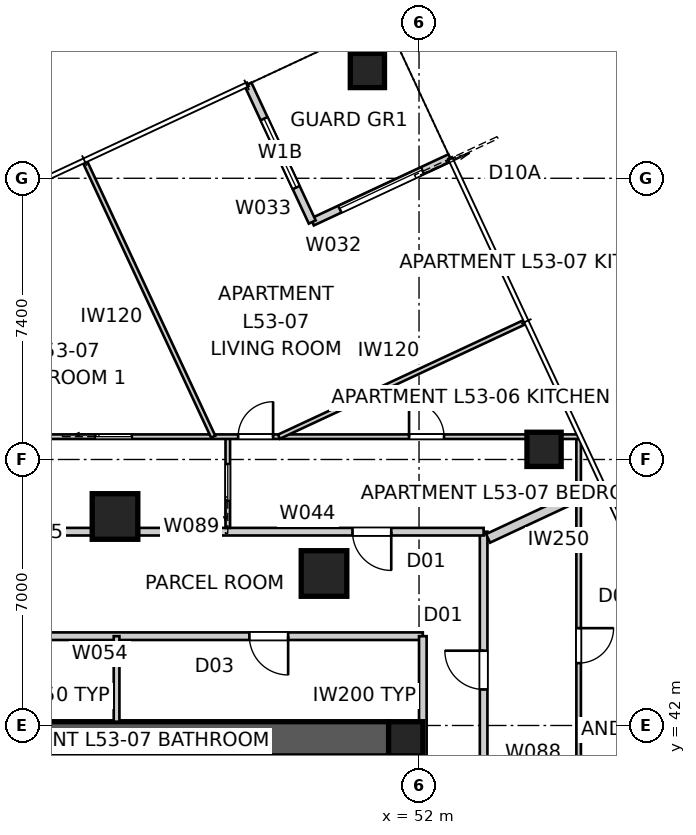
"""IFC4 building model, lengths in metres.
Left out: names, types, materials, properties, quantities, classifications, styles, units other than length and angle.
Written with IfcOpenShell. Run it as: python <this file> out.ifc"""

import sys

from ifc_helpers import new_model, si_unit, direction, frame, frame_2d, origin, origin_2d, place, context, subcontext, project, spatial, polyline, rectangle, outline, extrude, element, fill, save


model = new_model("IFC4")
c1 = context("Model", 3, precision=1e-05, world=origin(), true_north=direction((0.0, 1.0)))
c2 = subcontext(c1, "Body", "Model", "MODEL_VIEW")
j1 = project(units=[si_unit("LENGTHUNIT", "METRE"), si_unit("PLANEANGLEUNIT", "RADIAN")], contexts=[c1])
p1 = place(None, origin())
s1 = spatial("IfcSite", under=j1, at=p1, CompositionType="ELEMENT")
p2 = place(p1, origin())
s2 = spatial("IfcBuilding", under=s1, at=p2, CompositionType="ELEMENT")
p3 = place(p2, frame((0.0, 0.0, 193.0)))
s3 = spatial("IfcBuildingStorey", under=s2, at=p3, CompositionType="ELEMENT", Elevation=193.0)
p4 = place(p3, frame((28.8, 41.65, 0.0), z_axis=(0.0, 0.0, 1.0), x_axis=(1.0, 0.0, 0.0)))
e1 = element("IfcWall", 1, at=p4, inside=s3, PredefinedType="SHEAR", context=c2, shape_type="SweptSolid", body=[
    extrude(outline(polyline([(0.0, -0.45), (22.4, -0.45), (22.4, -0.025), (22.85, -0.025), (22.85, 0.025), (22.4, 0.025), (22.4, 0.45), (0.0, 0.45), (0.0, 0.025), (-0.45, 0.025), (-0.45, -0.025), (0.0, -0.025), (0.0, -0.45)])), origin(), (0.0, 0.0, 1.0), 3.4),
])
p5 = place(p3, frame((51.65, 18.8, 0.0), z_axis=(0.0, 0.0, 1.0), x_axis=(0.0, 1.0, 0.0)))
e2 = element("IfcWall", 2, at=p5, inside=s3, PredefinedType="SHEAR", context=c2, shape_type="SweptSolid", body=[
    extrude(outline(polyline([(0.0, -0.45), (22.4, -0.45), (22.4, -0.025), (22.85, -0.025), (22.85, 0.025), (22.4, 0.025), (22.4, 0.45), (0.0, 0.45), (0.0, 0.025), (-0.45, 0.025), (-0.45, -0.025), (0.0, -0.025), (0.0, -0.45)])), origin(), (0.0, 0.0, 1.0), 3.4),
])
p6 = place(p5, frame((11.14, 0.0, 0.0)))
e3 = element("IfcOpeningElement", 3, at=p6, cuts=e2, PredefinedType="OPENING", context=c2, shape_type="SweptSolid", body=[
    extrude(rectangle(XDim=1.02, YDim=2.4, at=frame_2d((0.51, 1.2))), frame((0.0, 0.46, 0.0), z_axis=(0.0, -1.0, 0.0), x_axis=(1.0, 0.0, 0.0)), (0.0, 0.0, 1.0), 0.92),
])
for number, where, z_axis, x_axis in (
    (4, (51.65, 41.65, 0.0), (0.0, 0.0, 1.0), (1.0, 0.0, 0.0)),
    (5, (55.29, 49.267, 0.0), (0.0, 0.0, 1.0), (1.0, 0.0, 0.0)),
    (6, (50.641, 59.236, 0.0), (0.0, 0.0, 1.0), (1.0, 0.0, 0.0)),
):
    element("IfcColumn", number, at=place(p3, frame(where, z_axis=z_axis, x_axis=x_axis)), inside=s3, PredefinedType="COLUMN", context=c2, shape_type="SweptSolid", body=[
        extrude(rectangle(XDim=0.9, YDim=0.9, at=origin_2d()), origin(), (0.0, 0.0, 1.0), 3.4),
    ])
for number, where, z_axis, x_axis in (
    (7, (49.5, 46.0, 0.0), (0.0, 0.0, 1.0), (1.0, 0.0, 0.0)),
    (8, (44.0, 47.5, 0.0), (0.0, 0.0, 1.0), (1.0, 0.0, 0.0)),
):
    element("IfcColumn", number, at=place(p3, frame(where, z_axis=z_axis, x_axis=x_axis)), inside=s3, PredefinedType="COLUMN", context=c2, shape_type="SweptSolid", body=[
        extrude(rectangle(XDim=1.2, YDim=1.2, at=origin_2d()), origin(), (0.0, 0.0, 1.0), 3.4),
    ])
p7 = place(p3, frame((52.815, 56.94, 0.0), z_axis=(0.0, 0.0, 1.0), x_axis=(-0.906289140828, -0.422658246362, 0.0)))
e9 = element("IfcWall", 9, at=p7, inside=s3, PredefinedType="SOLIDWALL", context=c2, shape_type="SweptSolid", body=[
    extrude(rectangle(XDim=4.0, YDim=0.2, at=frame_2d((2.0, 0.0))), origin(), (0.0, 0.0, 1.0), 3.25),
])
p8 = place(p7, frame((0.8, 0.0, 0.0)))
e10 = element("IfcOpeningElement", 10, at=p8, cuts=e9, PredefinedType="OPENING", context=c2, shape_type="SweptSolid", body=[
    extrude(rectangle(XDim=2.4, YDim=2.1, at=frame_2d((1.2, 1.05))), frame((0.0, 0.11, 0.0), z_axis=(0.0, -1.0, 0.0), x_axis=(1.0, 0.0, 0.0)), (0.0, 0.0, 1.0), 0.22),
])
p9 = place(p3, frame((49.19, 55.25, 0.0), z_axis=(0.0, 0.0, 1.0), x_axis=(-0.422658246362, 0.906289140828, 0.0)))
e11 = element("IfcWall", 11, at=p9, inside=s3, PredefinedType="SOLIDWALL", context=c2, shape_type="SweptSolid", body=[
    extrude(rectangle(XDim=4.0, YDim=0.2, at=frame_2d((2.0, 0.0))), origin(), (0.0, 0.0, 1.0), 3.25),
])
p10 = place(p9, frame((1.0, 0.0, 0.45)))
e12 = element("IfcOpeningElement", 12, at=p10, cuts=e11, PredefinedType="OPENING", context=c2, shape_type="SweptSolid", body=[
    extrude(rectangle(XDim=2.0, YDim=1.8, at=frame_2d((1.0, 0.9))), frame((0.0, 0.11, 0.0), z_axis=(0.0, -1.0, 0.0), x_axis=(1.0, 0.0, 0.0)), (0.0, 0.0, 1.0), 0.22),
])
p11 = place(p3, frame((53.7, 13.3, 0.0), z_axis=(0.0, 0.0, 1.0), x_axis=(0.0, 1.0, 0.0)))
e13 = element("IfcWall", 13, at=p11, inside=s3, PredefinedType="PARTITIONING", context=c2, shape_type="SweptSolid", body=[
    extrude(rectangle(XDim=33.8, YDim=0.2, at=frame_2d((16.9, 0.0))), origin(), (0.0, 0.0, 1.0), 3.25),
])
p12 = place(p11, frame((6.984, 0.0, 0.0)))
e14 = element("IfcOpeningElement", 14, at=p12, cuts=e13, PredefinedType="OPENING", context=c2, shape_type="SweptSolid", body=[
    extrude(rectangle(XDim=1.02, YDim=2.34, at=frame_2d((0.51, 1.17))), frame((0.0, 0.11, 0.0), z_axis=(0.0, -1.0, 0.0), x_axis=(1.0, 0.0, 0.0)), (0.0, 0.0, 1.0), 0.22),
])
p13 = place(p11, frame((29.648, 0.0, 0.0)))
e15 = element("IfcOpeningElement", 15, at=p13, cuts=e13, PredefinedType="OPENING", context=c2, shape_type="SweptSolid", body=[
    extrude(rectangle(XDim=1.02, YDim=2.34, at=frame_2d((0.51, 1.17))), frame((0.0, 0.11, 0.0), z_axis=(0.0, -1.0, 0.0), x_axis=(1.0, 0.0, 0.0)), (0.0, 0.0, 1.0), 0.22),
])
p14 = place(p11, frame((15.16, 0.0, 0.0)))
e16 = element("IfcOpeningElement", 16, at=p14, cuts=e13, PredefinedType="OPENING", context=c2, shape_type="SweptSolid", body=[
    extrude(rectangle(XDim=1.02, YDim=2.34, at=frame_2d((0.51, 1.17))), frame((0.0, 0.11, 0.0), z_axis=(0.0, -1.0, 0.0), x_axis=(1.0, 0.0, 0.0)), (0.0, 0.0, 1.0), 0.22),
])
p15 = place(p3, frame((53.7, 47.1, 0.0), z_axis=(0.0, 0.0, 1.0), x_axis=(-1.0, 0.0, 0.0)))
e17 = element("IfcWall", 17, at=p15, inside=s3, PredefinedType="PARTITIONING", context=c2, shape_type="SweptSolid", body=[
    extrude(rectangle(XDim=7.392, YDim=0.2, at=frame_2d((3.696, 0.0))), origin(), (0.0, 0.0, 1.0), 3.25),
])
p16 = place(p15, frame((2.431, 0.0, 0.0)))
e18 = element("IfcOpeningElement", 18, at=p16, cuts=e17, PredefinedType="OPENING", context=c2, shape_type="SweptSolid", body=[
    extrude(rectangle(XDim=1.02, YDim=2.34, at=frame_2d((0.51, 1.17))), frame((0.0, 0.11, 0.0), z_axis=(0.0, -1.0, 0.0), x_axis=(1.0, 0.0, 0.0)), (0.0, 0.0, 1.0), 0.22),
])
p17 = place(p3, frame((46.308, 47.1, 0.0), z_axis=(0.0, 0.0, 1.0), x_axis=(-1.0, 0.0, 0.0)))
e19 = element("IfcWall", 19, at=p17, inside=s3, PredefinedType="PARTITIONING", context=c2, shape_type="SweptSolid", body=[
    extrude(rectangle(XDim=1.683, YDim=0.2, at=frame_2d((0.842, 0.0))), origin(), (0.0, 0.0, 1.0), 2.55),
])
p18 = place(p3, frame((44.625, 47.1, 0.0), z_axis=(0.0, 0.0, 1.0), x_axis=(-1.0, 0.0, 0.0)))
e20 = element("IfcWall", 20, at=p18, inside=s3, PredefinedType="PARTITIONING", context=c2, shape_type="SweptSolid", body=[
    extrude(rectangle(XDim=9.25, YDim=0.2, at=frame_2d((4.625, 0.0))), origin(), (0.0, 0.0, 1.0), 3.25),
])
p19 = place(p3, frame((56.83, 48.33, 0.0), z_axis=(0.0, 0.0, 1.0), x_axis=(-0.906310647924, -0.422612126495, 0.0)))
e21 = element("IfcWall", 21, at=p19, inside=s3, PredefinedType="PARTITIONING", context=c2, shape_type="SweptSolid", body=[
    extrude(rectangle(XDim=3.325, YDim=0.25, at=frame_2d((1.663, 0.0))), origin(), (0.0, 0.0, 1.0), 3.25),
])
p20 = place(p3, frame((52.1, 44.35, 0.0), z_axis=(0.0, 0.0, 1.0), x_axis=(-1.0, 0.0, 0.0)))
e22 = element("IfcWall", 22, at=p20, inside=s3, PredefinedType="PARTITIONING", context=c2, shape_type="SweptSolid", body=[
    extrude(rectangle(XDim=24.2, YDim=0.2, at=frame_2d((12.1, 0.0))), origin(), (0.0, 0.0, 1.0), 3.25),
])
p21 = place(p20, frame((12.437, 0.0, 0.0)))
e23 = element("IfcOpeningElement", 23, at=p21, cuts=e22, PredefinedType="OPENING", context=c2, shape_type="SweptSolid", body=[
    extrude(rectangle(XDim=1.02, YDim=2.1, at=frame_2d((0.51, 1.05))), frame((0.0, 0.11, 0.0), z_axis=(0.0, -1.0, 0.0), x_axis=(1.0, 0.0, 0.0)), (0.0, 0.0, 1.0), 0.22),
])
p22 = place(p20, frame((3.544, 0.0, 0.0)))
e24 = element("IfcOpeningElement", 24, at=p22, cuts=e22, PredefinedType="OPENING", context=c2, shape_type="SweptSolid", body=[
    extrude(rectangle(XDim=1.02, YDim=2.1, at=frame_2d((0.51, 1.05))), frame((0.0, 0.11, 0.0), z_axis=(0.0, -1.0, 0.0), x_axis=(1.0, 0.0, 0.0)), (0.0, 0.0, 1.0), 0.22),
])
p23 = place(p20, frame((19.883, 0.0, 0.0)))
e25 = element("IfcOpeningElement", 25, at=p23, cuts=e22, PredefinedType="OPENING", context=c2, shape_type="SweptSolid", body=[
    extrude(rectangle(XDim=1.02, YDim=2.1, at=frame_2d((0.51, 1.05))), frame((0.0, 0.11, 0.0), z_axis=(0.0, -1.0, 0.0), x_axis=(1.0, 0.0, 0.0)), (0.0, 0.0, 1.0), 0.22),
])
p24 = place(p3, frame((52.1, 41.18, 0.0), z_axis=(0.0, 0.0, 1.0), x_axis=(0.0, 1.0, 0.0)))
e26 = element("IfcWall", 26, at=p24, inside=s3, PredefinedType="PARTITIONING", context=c2, shape_type="SweptSolid", body=[
    extrude(rectangle(XDim=3.17, YDim=0.2, at=frame_2d((1.585, 0.0))), origin(), (0.0, 0.0, 1.0), 3.25),
])
p25 = place(p3, frame((44.042, 42.1, 0.0), z_axis=(0.0, 0.0, 1.0), x_axis=(0.0, 1.0, 0.0)))
e27 = element("IfcWall", 27, at=p25, inside=s3, PredefinedType="SOLIDWALL", context=c2, shape_type="SweptSolid", body=[
    extrude(rectangle(XDim=2.25, YDim=0.15, at=frame_2d((1.125, 0.0))), origin(), (0.0, 0.0, 1.0), 3.25),
])
p26 = place(p3, frame((56.2, 49.642, 0.0), z_axis=(0.0, 0.0, 1.0), x_axis=(0.0, -1.0, 0.0)))
e28 = element("IfcWall", 28, at=p26, inside=s3, PredefinedType="PARTITIONING", context=c2, shape_type="SweptSolid", body=[
    extrude(rectangle(XDim=37.421, YDim=0.12, at=frame_2d((18.71, 0.0))), origin(), (0.0, 0.0, 1.0), 2.55),
])
p27 = place(p26, frame((27.488, 0.0, 0.0)))
e29 = element("IfcOpeningElement", 29, at=p27, cuts=e28, PredefinedType="OPENING", context=c2, shape_type="SweptSolid", body=[
    extrude(rectangle(XDim=0.92, YDim=2.34, at=frame_2d((0.46, 1.17))), frame((0.0, 0.07, 0.0), z_axis=(0.0, -1.0, 0.0), x_axis=(1.0, 0.0, 0.0)), (0.0, 0.0, 1.0), 0.14),
])
p28 = place(p26, frame((5.08, 0.0, 0.0)))
e30 = element("IfcOpeningElement", 30, at=p28, cuts=e28, PredefinedType="OPENING", context=c2, shape_type="SweptSolid", body=[
    extrude(rectangle(XDim=0.92, YDim=2.34, at=frame_2d((0.46, 1.17))), frame((0.0, 0.07, 0.0), z_axis=(0.0, -1.0, 0.0), x_axis=(1.0, 0.0, 0.0)), (0.0, 0.0, 1.0), 0.14),
])
p29 = place(p26, frame((19.592, 0.0, 0.0)))
e31 = element("IfcOpeningElement", 31, at=p29, cuts=e28, PredefinedType="OPENING", context=c2, shape_type="SweptSolid", body=[
    extrude(rectangle(XDim=0.92, YDim=2.34, at=frame_2d((0.46, 1.17))), frame((0.0, 0.07, 0.0), z_axis=(0.0, -1.0, 0.0), x_axis=(1.0, 0.0, 0.0)), (0.0, 0.0, 1.0), 0.14),
])
p30 = place(p3, frame((46.968, 47.2, 0.0), z_axis=(0.0, 0.0, 1.0), x_axis=(0.0, 1.0, 0.0)))
e32 = element("IfcWall", 32, at=p30, inside=s3, PredefinedType="PARTITIONING", context=c2, shape_type="SweptSolid", body=[
    extrude(rectangle(XDim=2.4, YDim=0.12, at=frame_2d((1.2, 0.0))), origin(), (0.0, 0.0, 1.0), 3.25),
])
p31 = place(p30, frame((0.72, 0.0, 0.0)))
e33 = element("IfcOpeningElement", 33, at=p31, cuts=e32, PredefinedType="OPENING", context=c2, shape_type="SweptSolid", body=[
    extrude(rectangle(XDim=0.96, YDim=2.1, at=frame_2d((0.48, 1.05))), frame((0.0, 0.07, 0.0), z_axis=(0.0, -1.0, 0.0), x_axis=(1.0, 0.0, 0.0)), (0.0, 0.0, 1.0), 0.14),
])
p32 = place(p3, frame((30.86, 49.6, 0.0), z_axis=(0.0, 0.0, 1.0), x_axis=(1.0, 0.0, 0.0)))
e34 = element("IfcWall", 34, at=p32, inside=s3, PredefinedType="PARTITIONING", context=c2, shape_type="SweptSolid", body=[
    extrude(rectangle(XDim=25.333, YDim=0.12, at=frame_2d((12.667, 0.0))), origin(), (0.0, 0.0, 1.0), 3.25),
])
p33 = place(p32, frame((20.877, 0.0, 0.0)))
e35 = element("IfcOpeningElement", 35, at=p33, cuts=e34, PredefinedType="OPENING", context=c2, shape_type="SweptSolid", body=[
    extrude(rectangle(XDim=0.92, YDim=2.34, at=frame_2d((0.46, 1.17))), frame((0.0, 0.07, 0.0), z_axis=(0.0, -1.0, 0.0), x_axis=(1.0, 0.0, 0.0)), (0.0, 0.0, 1.0), 0.14),
])
p34 = place(p32, frame((16.38, 0.0, 0.0)))
e36 = element("IfcOpeningElement", 36, at=p34, cuts=e34, PredefinedType="OPENING", context=c2, shape_type="SweptSolid", body=[
    extrude(rectangle(XDim=0.92, YDim=2.34, at=frame_2d((0.46, 1.17))), frame((0.0, 0.07, 0.0), z_axis=(0.0, -1.0, 0.0), x_axis=(1.0, 0.0, 0.0)), (0.0, 0.0, 1.0), 0.14),
])
p35 = place(p32, frame((12.623, 0.0, 0.0)))
e37 = element("IfcOpeningElement", 37, at=p35, cuts=e34, PredefinedType="OPENING", context=c2, shape_type="SweptSolid", body=[
    extrude(rectangle(XDim=0.96, YDim=2.1, at=frame_2d((0.48, 1.05))), frame((0.0, 0.07, 0.0), z_axis=(0.0, -1.0, 0.0), x_axis=(1.0, 0.0, 0.0)), (0.0, 0.0, 1.0), 0.14),
])
p36 = place(p32, frame((7.802, 0.0, 0.0)))
e38 = element("IfcOpeningElement", 38, at=p36, cuts=e34, PredefinedType="OPENING", context=c2, shape_type="SweptSolid", body=[
    extrude(rectangle(XDim=0.96, YDim=2.1, at=frame_2d((0.48, 1.05))), frame((0.0, 0.07, 0.0), z_axis=(0.0, -1.0, 0.0), x_axis=(1.0, 0.0, 0.0)), (0.0, 0.0, 1.0), 0.14),
])
p37 = place(p32, frame((2.168, 0.0, 0.0)))
e39 = element("IfcOpeningElement", 39, at=p37, cuts=e34, PredefinedType="OPENING", context=c2, shape_type="SweptSolid", body=[
    extrude(rectangle(XDim=0.96, YDim=2.1, at=frame_2d((0.48, 1.05))), frame((0.0, 0.07, 0.0), z_axis=(0.0, -1.0, 0.0), x_axis=(1.0, 0.0, 0.0)), (0.0, 0.0, 1.0), 0.14),
])
p38 = place(p3, frame((46.583, 49.6, 0.0), z_axis=(0.0, 0.0, 1.0), x_axis=(-0.422640876946, 0.90629724105, 0.0)))
e40 = element("IfcWall", 40, at=p38, inside=s3, PredefinedType="PARTITIONING", context=c2, shape_type="SweptSolid", body=[
    extrude(rectangle(XDim=7.979, YDim=0.12, at=frame_2d((3.989, 0.0))), origin(), (0.0, 0.0, 1.0), 3.25),
])
p39 = place(p3, frame((54.787, 52.618, 0.0), z_axis=(0.0, 0.0, 1.0), x_axis=(-0.906317589158, -0.422597240388, 0.0)))
e41 = element("IfcWall", 41, at=p39, inside=s3, PredefinedType="PARTITIONING", context=c2, shape_type="SweptSolid", body=[
    extrude(rectangle(XDim=7.142, YDim=0.12, at=frame_2d((3.571, 0.0))), origin(), (0.0, 0.0, 1.0), 3.25),
])
p40 = place(p8, origin())
e42 = element("IfcDoor", 42, at=p40, inside=s3, OperationType="SLIDING_TO_LEFT", PredefinedType="DOOR", context=c2, shape_type="SweptSolid", body=[
    extrude(rectangle(XDim=2.4, YDim=2.1, at=frame_2d((1.2, 1.05))), frame((0.0, 0.025, 0.0), z_axis=(0.0, -1.0, 0.0), x_axis=(1.0, 0.0, 0.0)), (0.0, 0.0, 1.0), 0.05),
])
fill(e10, e42)
p41 = place(p10, origin())
e43 = element("IfcWindow", 43, at=p41, inside=s3, PartitioningType="SINGLE_PANEL", PredefinedType="WINDOW", context=c2, shape_type="SweptSolid", body=[
    extrude(rectangle(XDim=2.0, YDim=1.8, at=frame_2d((1.0, 0.9))), frame((0.0, 0.03, 0.0), z_axis=(0.0, -1.0, 0.0), x_axis=(1.0, 0.0, 0.0)), (0.0, 0.0, 1.0), 0.06),
])
fill(e12, e43)
p42 = place(p22, origin())
e44 = element("IfcDoor", 44, at=p42, inside=s3, OperationType="SINGLE_SWING_LEFT", PredefinedType="DOOR", context=c2, shape_type="SweptSolid", body=[
    extrude(rectangle(XDim=1.02, YDim=2.1, at=frame_2d((0.51, 1.05))), frame((0.0, 0.025, 0.0), z_axis=(0.0, -1.0, 0.0), x_axis=(1.0, 0.0, 0.0)), (0.0, 0.0, 1.0), 0.05),
])
fill(e24, e44)
p43 = place(p13, origin())
e45 = element("IfcDoor", 45, at=p43, inside=s3, OperationType="SINGLE_SWING_RIGHT", PredefinedType="DOOR", context=c2, shape_type="SweptSolid", body=[
    extrude(rectangle(XDim=1.02, YDim=2.34, at=frame_2d((0.51, 1.17))), frame((0.0, 0.025, 0.0), z_axis=(0.0, -1.0, 0.0), x_axis=(1.0, 0.0, 0.0)), (0.0, 0.0, 1.0), 0.05),
])
fill(e15, e45)
p44 = place(p16, origin())
e46 = element("IfcDoor", 46, at=p44, inside=s3, OperationType="SINGLE_SWING_LEFT", PredefinedType="DOOR", context=c2, shape_type="SweptSolid", body=[
    extrude(rectangle(XDim=1.02, YDim=2.34, at=frame_2d((0.51, 1.17))), frame((0.0, 0.025, 0.0), z_axis=(0.0, -1.0, 0.0), x_axis=(1.0, 0.0, 0.0)), (0.0, 0.0, 1.0), 0.05),
])
fill(e18, e46)
p45 = place(p28, origin())
e47 = element("IfcDoor", 47, at=p45, inside=s3, OperationType="SINGLE_SWING_LEFT", PredefinedType="DOOR", context=c2, shape_type="SweptSolid", body=[
    extrude(rectangle(XDim=0.92, YDim=2.34, at=frame_2d((0.46, 1.17))), frame((0.0, 0.025, 0.0), z_axis=(0.0, -1.0, 0.0), x_axis=(1.0, 0.0, 0.0)), (0.0, 0.0, 1.0), 0.05),
])
fill(e30, e47)
p46 = place(p33, origin())
e48 = element("IfcDoor", 48, at=p46, inside=s3, OperationType="SINGLE_SWING_LEFT", PredefinedType="DOOR", context=c2, shape_type="SweptSolid", body=[
    extrude(rectangle(XDim=0.92, YDim=2.34, at=frame_2d((0.46, 1.17))), frame((0.0, 0.025, 0.0), z_axis=(0.0, -1.0, 0.0), x_axis=(1.0, 0.0, 0.0)), (0.0, 0.0, 1.0), 0.05),
])
fill(e35, e48)
p47 = place(p31, origin())
e49 = element("IfcDoor", 49, at=p47, inside=s3, OperationType="SLIDING_TO_LEFT", PredefinedType="DOOR", context=c2, shape_type="SweptSolid", body=[
    extrude(rectangle(XDim=0.96, YDim=2.1, at=frame_2d((0.48, 1.05))), frame((0.0, 0.025, 0.0), z_axis=(0.0, -1.0, 0.0), x_axis=(1.0, 0.0, 0.0)), (0.0, 0.0, 1.0), 0.05),
])
fill(e33, e49)
p48 = place(p34, origin())
e50 = element("IfcDoor", 50, at=p48, inside=s3, OperationType="SINGLE_SWING_RIGHT", PredefinedType="DOOR", context=c2, shape_type="SweptSolid", body=[
    extrude(rectangle(XDim=0.92, YDim=2.34, at=frame_2d((0.46, 1.17))), frame((0.0, 0.025, 0.0), z_axis=(0.0, -1.0, 0.0), x_axis=(1.0, 0.0, 0.0)), (0.0, 0.0, 1.0), 0.05),
])
fill(e36, e50)
p49 = place(p35, origin())
e51 = element("IfcDoor", 51, at=p49, inside=s3, OperationType="SLIDING_TO_LEFT", PredefinedType="DOOR", context=c2, shape_type="SweptSolid", body=[
    extrude(rectangle(XDim=0.96, YDim=2.1, at=frame_2d((0.48, 1.05))), frame((0.0, 0.025, 0.0), z_axis=(0.0, -1.0, 0.0), x_axis=(1.0, 0.0, 0.0)), (0.0, 0.0, 1.0), 0.05),
])
fill(e37, e51)
save(model, sys.argv[1])
